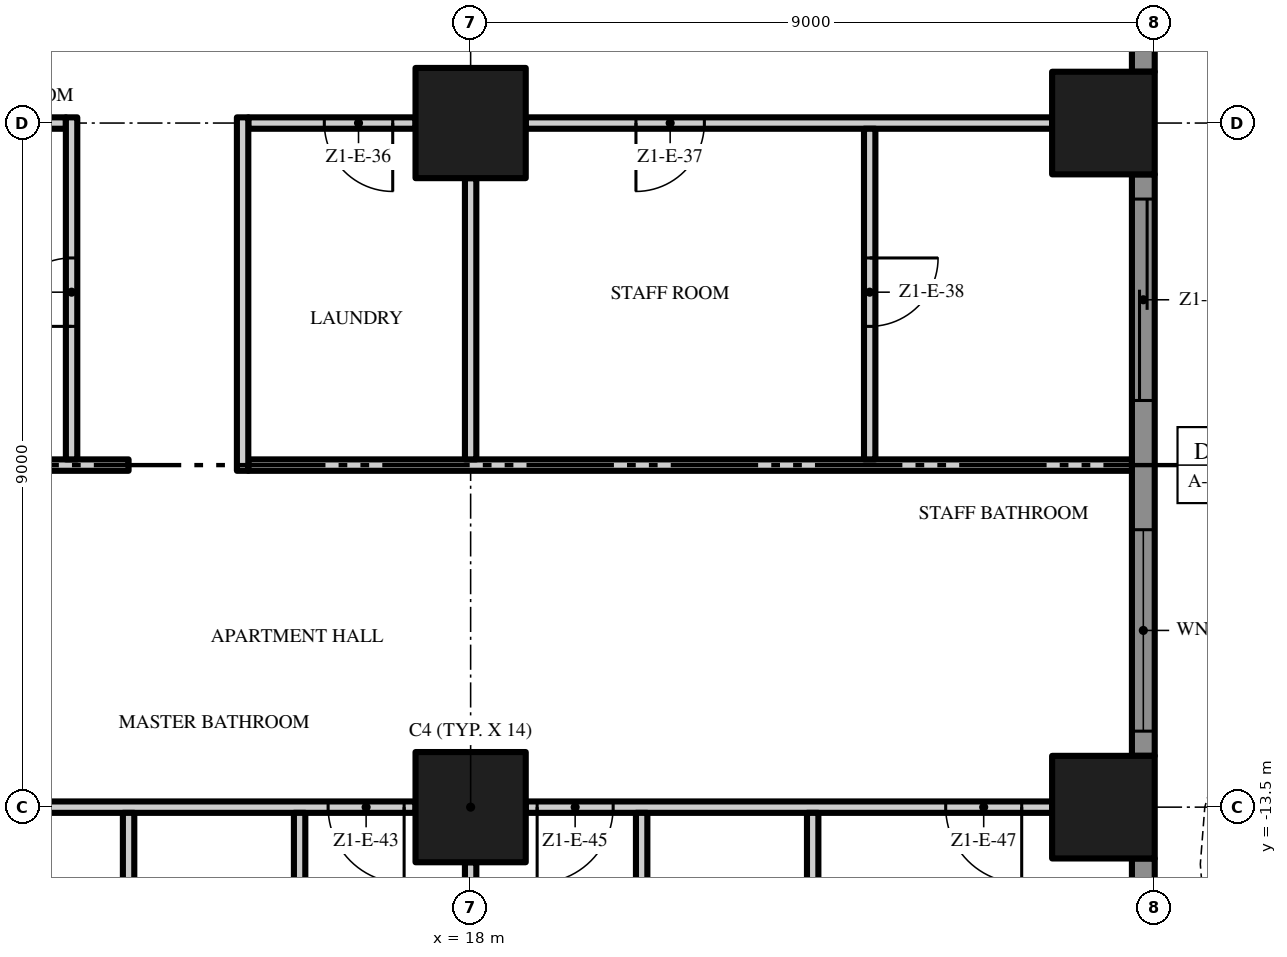
"""IFC4 building model, lengths in metres.
Left out: names, types, materials, properties, quantities, classifications, styles, units other than length and angle.
Written with IfcOpenShell. Run it as: python <this file> out.ifc"""

import sys

from ifc_helpers import new_model, si_unit, direction, frame, frame_2d, origin, origin_2d, place, context, subcontext, project, spatial, polyline, rectangle, outline, extrude, element, fill, save


model = new_model("IFC4")
c1 = context("Model", 3, precision=1e-05, world=origin(), true_north=direction((0.0, 1.0)))
c2 = subcontext(c1, "Body", "Model", "MODEL_VIEW")
j1 = project(units=[si_unit("LENGTHUNIT", "METRE"), si_unit("PLANEANGLEUNIT", "RADIAN")], contexts=[c1])
p1 = place(None, origin())
s1 = spatial("IfcSite", under=j1, at=p1, CompositionType="ELEMENT")
p2 = place(p1, origin())
s2 = spatial("IfcBuilding", under=s1, at=p2, CompositionType="ELEMENT")
p3 = place(p2, frame((0.0, 0.0, 60.6)))
s3 = spatial("IfcBuildingStorey", under=s2, at=p3, CompositionType="ELEMENT", Elevation=60.6)
for number, where, z_axis, x_axis in (
    (1, (18.0, -13.5, 0.0), (0.0, 0.0, 1.0), (1.0, 0.0, 0.0)),
    (2, (18.0, -4.5, 0.0), (0.0, 0.0, 1.0), (1.0, 0.0, 0.0)),
):
    element("IfcColumn", number, at=place(p3, frame(where, z_axis=z_axis, x_axis=x_axis)), inside=s3, PredefinedType="COLUMN", context=c2, shape_type="SweptSolid", body=[
        extrude(rectangle(XDim=1.45, YDim=1.45, at=origin_2d()), origin(), (0.0, 0.0, 1.0), 3.5),
    ])
for number, where, z_axis, x_axis in (
    (3, (26.325, -13.5, 0.0), (0.0, 0.0, 1.0), (1.0, 0.0, 0.0)),
    (4, (26.325, -4.5, 0.0), (0.0, 0.0, 1.0), (1.0, 0.0, 0.0)),
):
    element("IfcColumn", number, at=place(p3, frame(where, z_axis=z_axis, x_axis=x_axis)), inside=s3, PredefinedType="COLUMN", context=c2, shape_type="SweptSolid", body=[
        extrude(rectangle(XDim=1.35, YDim=1.35, at=origin_2d()), origin(), (0.0, 0.0, 1.0), 3.5),
    ])
p4 = place(p3, frame((26.85, -14.175, 0.0), z_axis=(0.0, 0.0, 1.0), x_axis=(0.0, -1.0, 0.0)))
e5 = element("IfcWall", 5, at=p4, inside=s3, PredefinedType="SOLIDWALL", context=c2, shape_type="SweptSolid", body=[
    extrude(rectangle(XDim=3.525, YDim=0.3, at=frame_2d((1.762, 0.0))), origin(), (0.0, 0.0, 1.0), 3.5),
])
p5 = place(p4, frame((0.325, 0.0, 0.45)))
e6 = element("IfcOpeningElement", 6, at=p5, cuts=e5, PredefinedType="OPENING", context=c2, shape_type="SweptSolid", body=[
    extrude(rectangle(XDim=2.65, YDim=2.65, at=frame_2d((1.325, 1.325))), frame((0.0, 0.16, 0.0), z_axis=(0.0, -1.0, 0.0), x_axis=(1.0, 0.0, 0.0)), (0.0, 0.0, 1.0), 0.32),
])
p6 = place(p3, frame((26.85, -5.175, 0.0), z_axis=(0.0, 0.0, 1.0), x_axis=(0.0, -1.0, 0.0)))
e7 = element("IfcWall", 7, at=p6, inside=s3, PredefinedType="SOLIDWALL", context=c2, shape_type="SweptSolid", body=[
    extrude(rectangle(XDim=7.65, YDim=0.3, at=frame_2d((3.825, 0.0))), origin(), (0.0, 0.0, 1.0), 3.5),
])
p7 = place(p6, frame((4.675, 0.0, 0.45)))
e8 = element("IfcOpeningElement", 8, at=p7, cuts=e7, PredefinedType="OPENING", context=c2, shape_type="SweptSolid", body=[
    extrude(rectangle(XDim=2.65, YDim=2.65, at=frame_2d((1.325, 1.325))), frame((0.0, 0.16, 0.0), z_axis=(0.0, -1.0, 0.0), x_axis=(1.0, 0.0, 0.0)), (0.0, 0.0, 1.0), 0.32),
])
p8 = place(p6, frame((0.325, 0.0, 0.0)))
e9 = element("IfcOpeningElement", 9, at=p8, cuts=e7, PredefinedType="OPENING", context=c2, shape_type="SweptSolid", body=[
    extrude(rectangle(XDim=2.65, YDim=2.4, at=frame_2d((1.325, 1.2))), frame((0.0, 0.16, 0.0), z_axis=(0.0, -1.0, 0.0), x_axis=(1.0, 0.0, 0.0)), (0.0, 0.0, 1.0), 0.32),
])
p9 = place(p3, frame((26.85, 3.825, 0.0), z_axis=(0.0, 0.0, 1.0), x_axis=(0.0, -1.0, 0.0)))
e10 = element("IfcWall", 10, at=p9, inside=s3, PredefinedType="SOLIDWALL", context=c2, shape_type="SweptSolid", body=[
    extrude(rectangle(XDim=7.65, YDim=0.3, at=frame_2d((3.825, 0.0))), origin(), (0.0, 0.0, 1.0), 3.5),
])
p10 = place(p9, frame((4.675, 0.0, 0.45)))
e11 = element("IfcOpeningElement", 11, at=p10, cuts=e10, PredefinedType="OPENING", context=c2, shape_type="SweptSolid", body=[
    extrude(rectangle(XDim=2.65, YDim=2.65, at=frame_2d((1.325, 1.325))), frame((0.0, 0.16, 0.0), z_axis=(0.0, -1.0, 0.0), x_axis=(1.0, 0.0, 0.0)), (0.0, 0.0, 1.0), 0.32),
])
p11 = place(p9, frame((0.325, 0.0, 0.45)))
e12 = element("IfcOpeningElement", 12, at=p11, cuts=e10, PredefinedType="OPENING", context=c2, shape_type="SweptSolid", body=[
    extrude(rectangle(XDim=2.65, YDim=2.65, at=frame_2d((1.325, 1.325))), frame((0.0, 0.16, 0.0), z_axis=(0.0, -1.0, 0.0), x_axis=(1.0, 0.0, 0.0)), (0.0, 0.0, 1.0), 0.32),
])
p12 = place(p3, origin())
e13 = element("IfcWall", 13, at=p12, inside=s3, PredefinedType="USERDEFINED", context=c2, shape_type="SweptSolid", body=[
    extrude(outline(polyline([(28.8, -18.0), (28.095, -16.5), (27.659, -15.0), (27.6, -14.25), (27.659, -13.5), (28.095, -12.0), (28.8, -10.5), (29.505, -9.0), (29.941, -7.5), (30.0, -6.75), (29.941, -6.0), (29.505, -4.5), (28.8, -3.0), (28.095, -1.5), (27.659, 0.0), (27.6, 0.75), (27.659, 1.5), (28.095, 3.0), (28.8, 4.5), (29.505, 6.0), (29.941, 7.5), (30.0, 8.25), (29.941, 9.0), (29.505, 10.5), (28.8, 12.0), (28.095, 13.5), (27.659, 15.0), (27.6, 15.75), (27.659, 16.5), (28.095, 18.0), (27.855, 18.07), (27.411, 16.545), (27.349, 15.75), (27.411, 14.955), (27.86, 13.411), (28.574, 11.894), (29.271, 10.411), (29.694, 8.955), (29.749, 8.25), (29.694, 7.545), (29.271, 6.089), (28.574, 4.606), (27.86, 3.089), (27.411, 1.545), (27.349, 0.75), (27.411, -0.045), (27.86, -1.589), (28.574, -3.106), (29.271, -4.589), (29.694, -6.045), (29.749, -6.75), (29.694, -7.455), (29.271, -8.911), (28.574, -10.394), (27.86, -11.911), (27.411, -13.455), (27.349, -14.25), (27.411, -15.045), (27.86, -16.589), (28.574, -18.106), (28.8, -18.0)])), origin(), (0.0, 0.0, 1.0), 0.9),
])
p13 = place(p3, frame((17.275, -13.5, 0.0), z_axis=(0.0, 0.0, 1.0), x_axis=(-1.0, 0.0, 0.0)))
e14 = element("IfcWall", 14, at=p13, inside=s3, PredefinedType="PARTITIONING", context=c2, shape_type="SweptSolid", body=[
    extrude(rectangle(XDim=7.55, YDim=0.15, at=frame_2d((3.775, 0.0))), origin(), (0.0, 0.0, 1.0), 3.5),
])
p14 = place(p13, frame((5.6, 0.0, 0.0)))
e15 = element("IfcOpeningElement", 15, at=p14, cuts=e14, PredefinedType="OPENING", context=c2, shape_type="SweptSolid", body=[
    extrude(rectangle(XDim=1.8, YDim=2.4, at=frame_2d((0.9, 1.2))), frame((0.0, 0.085, 0.0), z_axis=(0.0, -1.0, 0.0), x_axis=(1.0, 0.0, 0.0)), (0.0, 0.0, 1.0), 0.17),
])
p15 = place(p13, frame((0.15, 0.0, 0.0)))
e16 = element("IfcOpeningElement", 16, at=p15, cuts=e14, PredefinedType="OPENING", context=c2, shape_type="SweptSolid", body=[
    extrude(rectangle(XDim=1.0, YDim=2.4, at=frame_2d((0.5, 1.2))), frame((0.0, 0.085, 0.0), z_axis=(0.0, -1.0, 0.0), x_axis=(1.0, 0.0, 0.0)), (0.0, 0.0, 1.0), 0.17),
])
p16 = place(p3, frame((25.65, -13.5, 0.0), z_axis=(0.0, 0.0, 1.0), x_axis=(-1.0, 0.0, 0.0)))
e17 = element("IfcWall", 17, at=p16, inside=s3, PredefinedType="PARTITIONING", context=c2, shape_type="SweptSolid", body=[
    extrude(rectangle(XDim=6.925, YDim=0.15, at=frame_2d((3.462, 0.0))), origin(), (0.0, 0.0, 1.0), 3.5),
])
p17 = place(p16, frame((5.775, 0.0, 0.0)))
e18 = element("IfcOpeningElement", 18, at=p17, cuts=e17, PredefinedType="OPENING", context=c2, shape_type="SweptSolid", body=[
    extrude(rectangle(XDim=1.0, YDim=2.4, at=frame_2d((0.5, 1.2))), frame((0.0, 0.085, 0.0), z_axis=(0.0, -1.0, 0.0), x_axis=(1.0, 0.0, 0.0)), (0.0, 0.0, 1.0), 0.17),
])
p18 = place(p16, frame((0.4, 0.0, 0.0)))
e19 = element("IfcOpeningElement", 19, at=p18, cuts=e17, PredefinedType="OPENING", context=c2, shape_type="SweptSolid", body=[
    extrude(rectangle(XDim=1.0, YDim=2.4, at=frame_2d((0.5, 1.2))), frame((0.0, 0.085, 0.0), z_axis=(0.0, -1.0, 0.0), x_axis=(1.0, 0.0, 0.0)), (0.0, 0.0, 1.0), 0.17),
])
p19 = place(p3, frame((0.1, -9.0, 0.0), z_axis=(0.0, 0.0, 1.0), x_axis=(1.0, 0.0, 0.0)))
e20 = element("IfcWall", 20, at=p19, inside=s3, PredefinedType="PARTITIONING", context=c2, shape_type="SweptSolid", body=[
    extrude(rectangle(XDim=13.4, YDim=0.15, at=frame_2d((6.7, 0.0))), origin(), (0.0, 0.0, 1.0), 3.5),
])
p20 = place(p19, frame((0.4, 0.0, 0.0)))
e21 = element("IfcOpeningElement", 21, at=p20, cuts=e20, PredefinedType="OPENING", context=c2, shape_type="SweptSolid", body=[
    extrude(rectangle(XDim=0.8, YDim=2.0, at=frame_2d((0.4, 1.0))), frame((0.0, 0.085, 0.0), z_axis=(0.0, -1.0, 0.0), x_axis=(1.0, 0.0, 0.0)), (0.0, 0.0, 1.0), 0.17),
])
p21 = place(p19, frame((6.9, 0.0, 0.0)))
e22 = element("IfcOpeningElement", 22, at=p21, cuts=e20, PredefinedType="OPENING", context=c2, shape_type="SweptSolid", body=[
    extrude(rectangle(XDim=1.0, YDim=2.4, at=frame_2d((0.5, 1.2))), frame((0.0, 0.085, 0.0), z_axis=(0.0, -1.0, 0.0), x_axis=(1.0, 0.0, 0.0)), (0.0, 0.0, 1.0), 0.17),
])
p22 = place(p3, frame((15.075, -9.0, 0.0), z_axis=(0.0, 0.0, 1.0), x_axis=(1.0, 0.0, 0.0)))
e23 = element("IfcWall", 23, at=p22, inside=s3, PredefinedType="PARTITIONING", context=c2, shape_type="SweptSolid", body=[
    extrude(rectangle(XDim=11.625, YDim=0.15, at=frame_2d((5.812, 0.0))), origin(), (0.0, 0.0, 1.0), 3.5),
])
p23 = place(p3, frame((9.725, -4.5, 0.0), z_axis=(0.0, 0.0, 1.0), x_axis=(1.0, 0.0, 0.0)))
e24 = element("IfcWall", 24, at=p23, inside=s3, PredefinedType="PARTITIONING", context=c2, shape_type="SweptSolid", body=[
    extrude(rectangle(XDim=2.95, YDim=0.15, at=frame_2d((1.475, 0.0))), origin(), (0.0, 0.0, 1.0), 3.5),
])
p24 = place(p3, frame((17.275, -4.5, 0.0), z_axis=(0.0, 0.0, 1.0), x_axis=(-1.0, 0.0, 0.0)))
e25 = element("IfcWall", 25, at=p24, inside=s3, PredefinedType="PARTITIONING", context=c2, shape_type="SweptSolid", body=[
    extrude(rectangle(XDim=2.2, YDim=0.15, at=frame_2d((1.1, 0.0))), origin(), (0.0, 0.0, 1.0), 3.5),
])
p25 = place(p24, frame((0.3, 0.0, 0.0)))
e26 = element("IfcOpeningElement", 26, at=p25, cuts=e25, PredefinedType="OPENING", context=c2, shape_type="SweptSolid", body=[
    extrude(rectangle(XDim=0.9, YDim=2.1, at=frame_2d((0.45, 1.05))), frame((0.0, 0.085, 0.0), z_axis=(0.0, -1.0, 0.0), x_axis=(1.0, 0.0, 0.0)), (0.0, 0.0, 1.0), 0.17),
])
p26 = place(p3, frame((25.65, -4.5, 0.0), z_axis=(0.0, 0.0, 1.0), x_axis=(-1.0, 0.0, 0.0)))
e27 = element("IfcWall", 27, at=p26, inside=s3, PredefinedType="PARTITIONING", context=c2, shape_type="SweptSolid", body=[
    extrude(rectangle(XDim=6.925, YDim=0.15, at=frame_2d((3.462, 0.0))), origin(), (0.0, 0.0, 1.0), 3.5),
])
p27 = place(p26, frame((4.575, 0.0, 0.0)))
e28 = element("IfcOpeningElement", 28, at=p27, cuts=e27, PredefinedType="OPENING", context=c2, shape_type="SweptSolid", body=[
    extrude(rectangle(XDim=0.9, YDim=2.1, at=frame_2d((0.45, 1.05))), frame((0.0, 0.085, 0.0), z_axis=(0.0, -1.0, 0.0), x_axis=(1.0, 0.0, 0.0)), (0.0, 0.0, 1.0), 0.17),
])
p28 = place(p3, frame((12.75, -8.925, 0.0), z_axis=(0.0, 0.0, 1.0), x_axis=(0.0, 1.0, 0.0)))
e29 = element("IfcWall", 29, at=p28, inside=s3, PredefinedType="PARTITIONING", context=c2, shape_type="SweptSolid", body=[
    extrude(rectangle(XDim=4.5, YDim=0.15, at=frame_2d((2.25, 0.0))), origin(), (0.0, 0.0, 1.0), 3.5),
])
p29 = place(p28, frame((1.75, 0.0, 0.0)))
e30 = element("IfcOpeningElement", 30, at=p29, cuts=e29, PredefinedType="OPENING", context=c2, shape_type="SweptSolid", body=[
    extrude(rectangle(XDim=0.9, YDim=2.1, at=frame_2d((0.45, 1.05))), frame((0.0, 0.085, 0.0), z_axis=(0.0, -1.0, 0.0), x_axis=(1.0, 0.0, 0.0)), (0.0, 0.0, 1.0), 0.17),
])
p30 = place(p3, frame((13.5, -22.2, 0.0), z_axis=(0.0, 0.0, 1.0), x_axis=(0.0, 1.0, 0.0)))
e31 = element("IfcWall", 31, at=p30, inside=s3, PredefinedType="PARTITIONING", context=c2, shape_type="SweptSolid", body=[
    extrude(rectangle(XDim=8.625, YDim=0.15, at=frame_2d((4.312, 0.0))), origin(), (0.0, 0.0, 1.0), 3.5),
])
p31 = place(p3, frame((15.0, -9.075, 0.0), z_axis=(0.0, 0.0, 1.0), x_axis=(0.0, 1.0, 0.0)))
e32 = element("IfcWall", 32, at=p31, inside=s3, PredefinedType="PARTITIONING", context=c2, shape_type="SweptSolid", body=[
    extrude(rectangle(XDim=4.65, YDim=0.15, at=frame_2d((2.325, 0.0))), origin(), (0.0, 0.0, 1.0), 3.5),
])
p32 = place(p3, frame((15.75, -16.575, 0.0), z_axis=(0.0, 0.0, 1.0), x_axis=(0.0, 1.0, 0.0)))
e33 = element("IfcWall", 33, at=p32, inside=s3, PredefinedType="PARTITIONING", context=c2, shape_type="SweptSolid", body=[
    extrude(rectangle(XDim=3.0, YDim=0.15, at=frame_2d((1.5, 0.0))), origin(), (0.0, 0.0, 1.0), 3.5),
])
p33 = place(p3, frame((18.0, -21.15, 0.0), z_axis=(0.0, 0.0, 1.0), x_axis=(0.0, 1.0, 0.0)))
e34 = element("IfcWall", 34, at=p33, inside=s3, PredefinedType="PARTITIONING", context=c2, shape_type="SweptSolid", body=[
    extrude(rectangle(XDim=6.925, YDim=0.15, at=frame_2d((3.462, 0.0))), origin(), (0.0, 0.0, 1.0), 3.5),
])
p34 = place(p3, frame((18.0, -8.925, 0.0), z_axis=(0.0, 0.0, 1.0), x_axis=(0.0, 1.0, 0.0)))
e35 = element("IfcWall", 35, at=p34, inside=s3, PredefinedType="PARTITIONING", context=c2, shape_type="SweptSolid", body=[
    extrude(rectangle(XDim=3.7, YDim=0.15, at=frame_2d((1.85, 0.0))), origin(), (0.0, 0.0, 1.0), 3.5),
])
p35 = place(p3, frame((20.25, -16.575, 0.0), z_axis=(0.0, 0.0, 1.0), x_axis=(0.0, 1.0, 0.0)))
e36 = element("IfcWall", 36, at=p35, inside=s3, PredefinedType="PARTITIONING", context=c2, shape_type="SweptSolid", body=[
    extrude(rectangle(XDim=3.0, YDim=0.15, at=frame_2d((1.5, 0.0))), origin(), (0.0, 0.0, 1.0), 3.5),
])
p36 = place(p3, frame((22.5, -17.325, 0.0), z_axis=(0.0, 0.0, 1.0), x_axis=(0.0, 1.0, 0.0)))
e37 = element("IfcWall", 37, at=p36, inside=s3, PredefinedType="PARTITIONING", context=c2, shape_type="SweptSolid", body=[
    extrude(rectangle(XDim=3.75, YDim=0.15, at=frame_2d((1.875, 0.0))), origin(), (0.0, 0.0, 1.0), 3.5),
])
p37 = place(p3, frame((23.25, -4.575, 0.0), z_axis=(0.0, 0.0, 1.0), x_axis=(0.0, -1.0, 0.0)))
e38 = element("IfcWall", 38, at=p37, inside=s3, PredefinedType="PARTITIONING", context=c2, shape_type="SweptSolid", body=[
    extrude(rectangle(XDim=4.35, YDim=0.15, at=frame_2d((2.175, 0.0))), origin(), (0.0, 0.0, 1.0), 3.5),
])
p38 = place(p37, frame((1.7, 0.0, 0.0)))
e39 = element("IfcOpeningElement", 39, at=p38, cuts=e38, PredefinedType="OPENING", context=c2, shape_type="SweptSolid", body=[
    extrude(rectangle(XDim=0.9, YDim=2.1, at=frame_2d((0.45, 1.05))), frame((0.0, 0.085, 0.0), z_axis=(0.0, -1.0, 0.0), x_axis=(1.0, 0.0, 0.0)), (0.0, 0.0, 1.0), 0.17),
])
p39 = place(p7, origin())
e40 = element("IfcWindow", 40, at=p39, inside=s3, PartitioningType="SINGLE_PANEL", PredefinedType="WINDOW", context=c2, shape_type="SweptSolid", body=[
    extrude(rectangle(XDim=2.65, YDim=2.65, at=frame_2d((1.325, 1.325))), frame((0.0, 0.03, 0.0), z_axis=(0.0, -1.0, 0.0), x_axis=(1.0, 0.0, 0.0)), (0.0, 0.0, 1.0), 0.06),
])
fill(e8, e40)
p40 = place(p8, origin())
e41 = element("IfcDoor", 41, at=p40, inside=s3, OperationType="SINGLE_SWING_LEFT", PredefinedType="DOOR", context=c2, shape_type="SweptSolid", body=[
    extrude(rectangle(XDim=2.65, YDim=2.4, at=frame_2d((1.325, 1.2))), frame((0.0, 0.025, 0.0), z_axis=(0.0, -1.0, 0.0), x_axis=(1.0, 0.0, 0.0)), (0.0, 0.0, 1.0), 0.05),
])
fill(e9, e41)
p41 = place(p29, origin())
e42 = element("IfcDoor", 42, at=p41, inside=s3, OperationType="SINGLE_SWING_LEFT", PredefinedType="DOOR", context=c2, shape_type="SweptSolid", body=[
    extrude(rectangle(XDim=0.9, YDim=2.1, at=frame_2d((0.45, 1.05))), frame((0.0, 0.025, 0.0), z_axis=(0.0, -1.0, 0.0), x_axis=(1.0, 0.0, 0.0)), (0.0, 0.0, 1.0), 0.05),
])
fill(e30, e42)
p42 = place(p25, origin())
e43 = element("IfcDoor", 43, at=p42, inside=s3, OperationType="SINGLE_SWING_LEFT", PredefinedType="DOOR", context=c2, shape_type="SweptSolid", body=[
    extrude(rectangle(XDim=0.9, YDim=2.1, at=frame_2d((0.45, 1.05))), frame((0.0, 0.025, 0.0), z_axis=(0.0, -1.0, 0.0), x_axis=(1.0, 0.0, 0.0)), (0.0, 0.0, 1.0), 0.05),
])
fill(e26, e43)
p43 = place(p27, origin())
e44 = element("IfcDoor", 44, at=p43, inside=s3, OperationType="SINGLE_SWING_RIGHT", PredefinedType="DOOR", context=c2, shape_type="SweptSolid", body=[
    extrude(rectangle(XDim=0.9, YDim=2.1, at=frame_2d((0.45, 1.05))), frame((0.0, 0.025, 0.0), z_axis=(0.0, -1.0, 0.0), x_axis=(1.0, 0.0, 0.0)), (0.0, 0.0, 1.0), 0.05),
])
fill(e28, e44)
p44 = place(p38, origin())
e45 = element("IfcDoor", 45, at=p44, inside=s3, OperationType="SINGLE_SWING_LEFT", PredefinedType="DOOR", context=c2, shape_type="SweptSolid", body=[
    extrude(rectangle(XDim=0.9, YDim=2.1, at=frame_2d((0.45, 1.05))), frame((0.0, 0.025, 0.0), z_axis=(0.0, -1.0, 0.0), x_axis=(1.0, 0.0, 0.0)), (0.0, 0.0, 1.0), 0.05),
])
fill(e39, e45)
p45 = place(p15, origin())
e46 = element("IfcDoor", 46, at=p45, inside=s3, OperationType="SINGLE_SWING_LEFT", PredefinedType="DOOR", context=c2, shape_type="SweptSolid", body=[
    extrude(rectangle(XDim=1.0, YDim=2.4, at=frame_2d((0.5, 1.2))), frame((0.0, 0.025, 0.0), z_axis=(0.0, -1.0, 0.0), x_axis=(1.0, 0.0, 0.0)), (0.0, 0.0, 1.0), 0.05),
])
fill(e16, e46)
p46 = place(p17, origin())
e47 = element("IfcDoor", 47, at=p46, inside=s3, OperationType="SINGLE_SWING_RIGHT", PredefinedType="DOOR", context=c2, shape_type="SweptSolid", body=[
    extrude(rectangle(XDim=1.0, YDim=2.4, at=frame_2d((0.5, 1.2))), frame((0.0, 0.025, 0.0), z_axis=(0.0, -1.0, 0.0), x_axis=(1.0, 0.0, 0.0)), (0.0, 0.0, 1.0), 0.05),
])
fill(e18, e47)
p47 = place(p18, origin())
e48 = element("IfcDoor", 48, at=p47, inside=s3, OperationType="SINGLE_SWING_LEFT", PredefinedType="DOOR", context=c2, shape_type="SweptSolid", body=[
    extrude(rectangle(XDim=1.0, YDim=2.4, at=frame_2d((0.5, 1.2))), frame((0.0, 0.025, 0.0), z_axis=(0.0, -1.0, 0.0), x_axis=(1.0, 0.0, 0.0)), (0.0, 0.0, 1.0), 0.05),
])
fill(e19, e48)
save(model, sys.argv[1])
